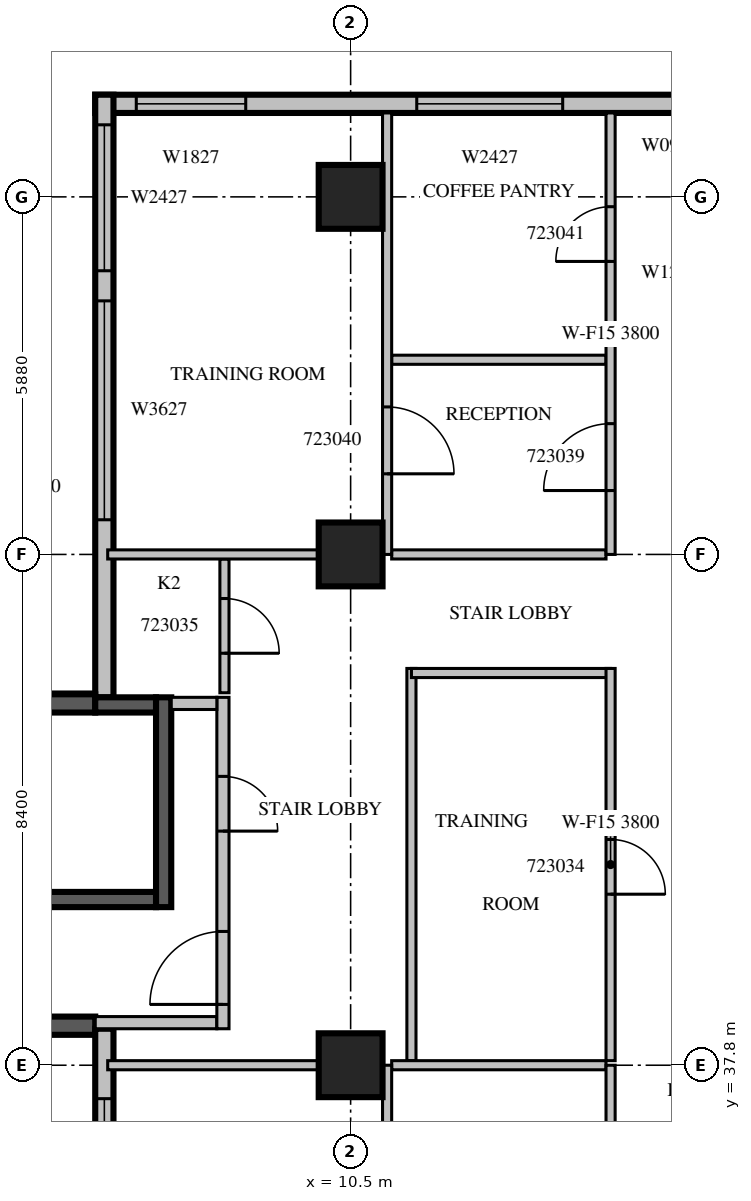
"""IFC4 building model, lengths in metres.
Left out: names, types, materials, properties, quantities, classifications, styles, units other than length and angle.
Written with IfcOpenShell. Run it as: python <this file> out.ifc"""

import sys

from ifc_helpers import new_model, si_unit, direction, frame, frame_2d, origin, origin_2d, place, context, subcontext, project, spatial, rectangle, extrude, source, transform, mapped, element, fill, save


model = new_model("IFC4")
c1 = context("Model", 3, precision=1e-05, world=origin(), true_north=direction((0.0, 1.0)))
c2 = subcontext(c1, "Body", "Model", "MODEL_VIEW")
j1 = project(units=[si_unit("LENGTHUNIT", "METRE"), si_unit("PLANEANGLEUNIT", "RADIAN")], contexts=[c1])
p1 = place(None, origin())
s1 = spatial("IfcSite", under=j1, at=p1, CompositionType="ELEMENT")
p2 = place(p1, origin())
s2 = spatial("IfcBuilding", under=s1, at=p2, CompositionType="ELEMENT")
p3 = place(p2, frame((0.0, 0.0, 107.7)))
s3 = spatial("IfcBuildingStorey", under=s2, at=p3, CompositionType="ELEMENT", Elevation=107.7)
m1 = source(origin(), c2, "Body", "SweptSolid", [
    extrude(rectangle(XDim=1.05, YDim=1.05, at=origin_2d()), origin(), (0.0, 0.0, 1.0), 4.2),
])
for number, where, z_axis, x_axis in (
    (1, (10.5, 37.8, 0.0), (0.0, 0.0, 1.0), (1.0, 0.0, 0.0)),
    (2, (10.5, 46.2, 0.0), (0.0, 0.0, 1.0), (1.0, 0.0, 0.0)),
    (3, (10.5, 52.08, 0.0), (0.0, 0.0, 1.0), (1.0, 0.0, 0.0)),
):
    element("IfcColumn", number, at=place(p3, frame(where, z_axis=z_axis, x_axis=x_axis)), inside=s3, PredefinedType="COLUMN", context=c2, shape_type="MappedRepresentation", body=[
        mapped(m1, transform((0.0, 0.0, 0.0), scale=1.0)),
    ])
m2 = source(origin(), c2, "Body", "SweptSolid", [
    extrude(rectangle(XDim=10.5, YDim=0.3, at=frame_2d((5.25, 0.0))), origin(), (0.0, 0.0, 1.0), 3.8),
])
p4 = place(p3, frame((16.8, 53.61, 0.0), z_axis=(0.0, 0.0, 1.0), x_axis=(-1.0, 0.0, 0.0)))
e4 = element("IfcWall", 4, at=p4, inside=s3, PredefinedType="STANDARD", context=c2, shape_type="MappedRepresentation", body=[
    mapped(m2, transform((0.0, 0.0, 0.0), scale=1.0)),
])
m3 = source(origin(), c2, "Body", "SweptSolid", [
    extrude(rectangle(XDim=1.8, YDim=2.7, at=frame_2d((0.9, 1.35))), frame((0.0, 0.16, 0.0), z_axis=(0.0, -1.0, 0.0), x_axis=(1.0, 0.0, 0.0)), (0.0, 0.0, 1.0), 0.32),
])
p5 = place(p4, frame((8.025, 0.0, 0.6)))
e5 = element("IfcOpeningElement", 5, at=p5, cuts=e4, PredefinedType="OPENING", context=c2, shape_type="MappedRepresentation", body=[
    mapped(m3, transform((0.0, 0.0, 0.0), scale=1.0)),
])
m4 = source(origin(), c2, "Body", "SweptSolid", [
    extrude(rectangle(XDim=2.4, YDim=2.7, at=frame_2d((1.2, 1.35))), frame((0.0, 0.16, 0.0), z_axis=(0.0, -1.0, 0.0), x_axis=(1.0, 0.0, 0.0)), (0.0, 0.0, 1.0), 0.32),
])
p6 = place(p4, frame((2.812, 0.0, 0.6)))
e6 = element("IfcOpeningElement", 6, at=p6, cuts=e4, PredefinedType="OPENING", context=c2, shape_type="MappedRepresentation", body=[
    mapped(m4, transform((0.0, 0.0, 0.0), scale=1.0)),
])
m5 = source(origin(), c2, "Body", "SweptSolid", [
    extrude(rectangle(XDim=9.91, YDim=0.3, at=frame_2d((4.955, 0.0))), origin(), (0.0, 0.0, 1.0), 3.8),
])
p7 = place(p3, frame((6.45, 53.76, 0.0), z_axis=(0.0, 0.0, 1.0), x_axis=(0.0, -1.0, 0.0)))
e7 = element("IfcWall", 7, at=p7, inside=s3, PredefinedType="STANDARD", context=c2, shape_type="MappedRepresentation", body=[
    mapped(m5, transform((0.0, 0.0, 0.0), scale=1.0)),
])
m6 = source(origin(), c2, "Body", "SweptSolid", [
    extrude(rectangle(XDim=3.6, YDim=2.7, at=frame_2d((1.8, 1.35))), frame((0.0, 0.16, 0.0), z_axis=(0.0, -1.0, 0.0), x_axis=(1.0, 0.0, 0.0)), (0.0, 0.0, 1.0), 0.32),
])
p8 = place(p7, frame((3.39, 0.0, 0.6)))
e8 = element("IfcOpeningElement", 8, at=p8, cuts=e7, PredefinedType="OPENING", context=c2, shape_type="MappedRepresentation", body=[
    mapped(m6, transform((0.0, 0.0, 0.0), scale=1.0)),
])
p9 = place(p7, frame((0.495, 0.0, 0.6)))
e9 = element("IfcOpeningElement", 9, at=p9, cuts=e7, PredefinedType="OPENING", context=c2, shape_type="MappedRepresentation", body=[
    mapped(m4, transform((0.0, 0.0, 0.0), scale=1.0)),
])
m7 = source(origin(), c2, "Body", "SweptSolid", [
    extrude(rectangle(XDim=6.1, YDim=0.3, at=frame_2d((3.05, 0.0))), origin(), (0.0, 0.0, 1.0), 3.8),
])
for number, where, z_axis, x_axis in (
    (10, (6.3, 43.75, 0.0), (0.0, 0.0, 1.0), (-1.0, 0.0, 0.0)),
    (11, (0.2, 38.45, 0.0), (0.0, 0.0, 1.0), (1.0, 0.0, 0.0)),
):
    element("IfcWall", number, at=place(p3, frame(where, z_axis=z_axis, x_axis=x_axis)), inside=s3, PredefinedType="SOLIDWALL", context=c2, shape_type="MappedRepresentation", body=[
        mapped(m7, transform((0.0, 0.0, 0.0), scale=1.0)),
    ])
p10 = place(p3, frame((6.45, 38.4, 0.0), z_axis=(0.0, 0.0, 1.0), x_axis=(0.0, -1.0, 0.0)))
e12 = element("IfcWall", 12, at=p10, inside=s3, PredefinedType="STANDARD", context=c2, shape_type="SweptSolid", body=[
    extrude(rectangle(XDim=16.4, YDim=0.3, at=frame_2d((8.2, 0.0))), origin(), (0.0, 0.0, 1.0), 3.8),
])
p11 = place(p10, frame((1.15, 0.0, 0.6)))
e13 = element("IfcOpeningElement", 13, at=p11, cuts=e12, PredefinedType="OPENING", context=c2, shape_type="MappedRepresentation", body=[
    mapped(m3, transform((0.0, 0.0, 0.0), scale=1.0)),
])
p12 = place(p10, frame((9.438, 0.0, 0.6)))
e14 = element("IfcOpeningElement", 14, at=p12, cuts=e12, PredefinedType="OPENING", context=c2, shape_type="MappedRepresentation", body=[
    mapped(m3, transform((0.0, 0.0, 0.0), scale=1.0)),
])
p13 = place(p10, frame((13.537, 0.0, 0.6)))
e15 = element("IfcOpeningElement", 15, at=p13, cuts=e12, PredefinedType="OPENING", context=c2, shape_type="MappedRepresentation", body=[
    mapped(m3, transform((0.0, 0.0, 0.0), scale=1.0)),
])
m8 = source(origin(), c2, "Body", "SweptSolid", [
    extrude(rectangle(XDim=1.0, YDim=2.1, at=frame_2d((0.5, 1.05))), frame((0.0, 0.16, 0.0), z_axis=(0.0, -1.0, 0.0), x_axis=(1.0, 0.0, 0.0)), (0.0, 0.0, 1.0), 0.32),
])
p14 = place(p10, frame((5.908, 0.0, 0.0)))
e16 = element("IfcOpeningElement", 16, at=p14, cuts=e12, PredefinedType="OPENING", context=c2, shape_type="MappedRepresentation", body=[
    mapped(m8, transform((0.0, 0.0, 0.0), scale=1.0)),
])
m9 = source(origin(), c2, "Body", "SweptSolid", [
    extrude(rectangle(XDim=7.0, YDim=0.25, at=frame_2d((3.5, 0.0))), origin(), (0.0, 0.0, 1.0), 3.8),
])
p15 = place(p3, frame((0.3, 40.525, 0.0), z_axis=(0.0, 0.0, 1.0), x_axis=(1.0, 0.0, 0.0)))
e17 = element("IfcWall", 17, at=p15, inside=s3, PredefinedType="SOLIDWALL", context=c2, shape_type="MappedRepresentation", body=[
    mapped(m9, transform((0.0, 0.0, 0.0), scale=1.0)),
])
m10 = source(origin(), c2, "Body", "SweptSolid", [
    extrude(rectangle(XDim=1.1, YDim=2.1, at=frame_2d((0.55, 1.05))), frame((0.0, 0.135, 0.0), z_axis=(0.0, -1.0, 0.0), x_axis=(1.0, 0.0, 0.0)), (0.0, 0.0, 1.0), 0.27),
])
p16 = place(p15, frame((0.55, 0.0, 0.0)))
e18 = element("IfcOpeningElement", 18, at=p16, cuts=e17, PredefinedType="OPENING", context=c2, shape_type="MappedRepresentation", body=[
    mapped(m10, transform((0.0, 0.0, 0.0), scale=1.0)),
])
m11 = source(origin(), c2, "Body", "SweptSolid", [
    extrude(rectangle(XDim=1.0, YDim=0.25, at=frame_2d((0.5, 0.0))), origin(), (0.0, 0.0, 1.0), 3.8),
])
p17 = place(p3, frame((6.3, 43.725, 0.0), z_axis=(0.0, 0.0, 1.0), x_axis=(1.0, 0.0, 0.0)))
e19 = element("IfcWall", 19, at=p17, inside=s3, PredefinedType="SOLIDWALL", context=c2, shape_type="MappedRepresentation", body=[
    mapped(m11, transform((0.0, 0.0, 0.0), scale=1.0)),
])
m12 = source(origin(), c2, "Body", "SweptSolid", [
    extrude(rectangle(XDim=3.45, YDim=0.25, at=frame_2d((1.725, 0.0))), origin(), (0.0, 0.0, 1.0), 3.8),
])
p18 = place(p3, frame((7.425, 40.4, 0.0), z_axis=(0.0, 0.0, 1.0), x_axis=(0.0, 1.0, 0.0)))
e20 = element("IfcWall", 20, at=p18, inside=s3, PredefinedType="SOLIDWALL", context=c2, shape_type="MappedRepresentation", body=[
    mapped(m12, transform((0.0, 0.0, 0.0), scale=1.0)),
])
m13 = source(origin(), c2, "Body", "SweptSolid", [
    extrude(rectangle(XDim=2.0, YDim=0.2, at=frame_2d((1.0, 0.0))), origin(), (0.0, 0.0, 1.0), 3.8),
])
p19 = place(p3, frame((6.3, 38.5, 0.0), z_axis=(0.0, 0.0, 1.0), x_axis=(1.0, 0.0, 0.0)))
e21 = element("IfcWall", 21, at=p19, inside=s3, PredefinedType="PARTITIONING", context=c2, shape_type="MappedRepresentation", body=[
    mapped(m13, transform((0.0, 0.0, 0.0), scale=1.0)),
])
m14 = source(origin(), c2, "Body", "SweptSolid", [
    extrude(rectangle(XDim=5.45, YDim=0.2, at=frame_2d((2.725, 0.0))), origin(), (0.0, 0.0, 1.0), 3.8),
])
p20 = place(p3, frame((8.4, 38.4, 0.0), z_axis=(0.0, 0.0, 1.0), x_axis=(0.0, 1.0, 0.0)))
e22 = element("IfcWall", 22, at=p20, inside=s3, PredefinedType="PARTITIONING", context=c2, shape_type="MappedRepresentation", body=[
    mapped(m14, transform((0.0, 0.0, 0.0), scale=1.0)),
])
m15 = source(origin(), c2, "Body", "SweptSolid", [
    extrude(rectangle(XDim=1.2, YDim=2.1, at=frame_2d((0.6, 1.05))), frame((0.0, 0.11, 0.0), z_axis=(0.0, -1.0, 0.0), x_axis=(1.0, 0.0, 0.0)), (0.0, 0.0, 1.0), 0.22),
])
p21 = place(p20, frame((0.4, 0.0, 0.0)))
e23 = element("IfcOpeningElement", 23, at=p21, cuts=e22, PredefinedType="OPENING", context=c2, shape_type="MappedRepresentation", body=[
    mapped(m15, transform((0.0, 0.0, 0.0), scale=1.0)),
])
m16 = source(origin(), c2, "Body", "SweptSolid", [
    extrude(rectangle(XDim=0.9, YDim=2.1, at=frame_2d((0.45, 1.05))), frame((0.0, 0.11, 0.0), z_axis=(0.0, -1.0, 0.0), x_axis=(1.0, 0.0, 0.0)), (0.0, 0.0, 1.0), 0.22),
])
p22 = place(p20, frame((3.25, 0.0, 0.0)))
e24 = element("IfcOpeningElement", 24, at=p22, cuts=e22, PredefinedType="OPENING", context=c2, shape_type="MappedRepresentation", body=[
    mapped(m16, transform((0.0, 0.0, 0.0), scale=1.0)),
])
m17 = source(origin(), c2, "Body", "SweptSolid", [
    extrude(rectangle(XDim=0.75, YDim=0.2, at=frame_2d((0.375, 0.0))), origin(), (0.0, 0.0, 1.0), 3.8),
])
p23 = place(p3, frame((7.55, 43.75, 0.0), z_axis=(0.0, 0.0, 1.0), x_axis=(1.0, 0.0, 0.0)))
e25 = element("IfcWall", 25, at=p23, inside=s3, PredefinedType="PARTITIONING", context=c2, shape_type="MappedRepresentation", body=[
    mapped(m17, transform((0.0, 0.0, 0.0), scale=1.0)),
])
m18 = source(origin(), c2, "Body", "SweptSolid", [
    extrude(rectangle(XDim=6.45, YDim=0.15, at=frame_2d((3.225, 0.0))), origin(), (0.0, 0.0, 1.0), 3.8),
])
p24 = place(p3, frame((11.5, 44.325, 0.0), z_axis=(0.0, 0.0, 1.0), x_axis=(0.0, -1.0, 0.0)))
e26 = element("IfcWall", 26, at=p24, inside=s3, PredefinedType="PARTITIONING", context=c2, shape_type="MappedRepresentation", body=[
    mapped(m18, transform((0.0, 0.0, 0.0), scale=1.0)),
])
m19 = source(origin(), c2, "Body", "SweptSolid", [
    extrude(rectangle(XDim=3.275, YDim=0.15, at=frame_2d((1.637, 0.0))), origin(), (0.0, 0.0, 1.0), 3.8),
])
p25 = place(p3, frame((14.775, 44.25, 0.0), z_axis=(0.0, 0.0, 1.0), x_axis=(-1.0, 0.0, 0.0)))
e27 = element("IfcWall", 27, at=p25, inside=s3, PredefinedType="PARTITIONING", context=c2, shape_type="MappedRepresentation", body=[
    mapped(m19, transform((0.0, 0.0, 0.0), scale=1.0)),
])
p26 = place(p3, frame((14.775, 37.875, 0.0), z_axis=(0.0, 0.0, 1.0), x_axis=(0.0, 1.0, 0.0)))
e28 = element("IfcWall", 28, at=p26, inside=s3, PredefinedType="PARTITIONING", context=c2, shape_type="MappedRepresentation", body=[
    mapped(m18, transform((0.0, 0.0, 0.0), scale=1.0)),
])
m20 = source(origin(), c2, "Body", "SweptSolid", [
    extrude(rectangle(XDim=0.9, YDim=2.1, at=frame_2d((0.45, 1.05))), frame((0.0, 0.085, 0.0), z_axis=(0.0, -1.0, 0.0), x_axis=(1.0, 0.0, 0.0)), (0.0, 0.0, 1.0), 0.17),
])
p27 = place(p26, frame((2.737, 0.0, 0.0)))
e29 = element("IfcOpeningElement", 29, at=p27, cuts=e28, PredefinedType="OPENING", context=c2, shape_type="MappedRepresentation", body=[
    mapped(m20, transform((0.0, 0.0, 0.0), scale=1.0)),
])
m21 = source(origin(), c2, "Body", "SweptSolid", [
    extrude(rectangle(XDim=2.2, YDim=0.15, at=frame_2d((1.1, 0.0))), origin(), (0.0, 0.0, 1.0), 3.8),
])
p28 = place(p3, frame((8.425, 43.925, 0.0), z_axis=(0.0, 0.0, 1.0), x_axis=(0.0, 1.0, 0.0)))
e30 = element("IfcWall", 30, at=p28, inside=s3, PredefinedType="PARTITIONING", context=c2, shape_type="MappedRepresentation", body=[
    mapped(m21, transform((0.0, 0.0, 0.0), scale=1.0)),
])
p29 = place(p28, frame((0.65, 0.0, 0.0)))
e31 = element("IfcOpeningElement", 31, at=p29, cuts=e30, PredefinedType="OPENING", context=c2, shape_type="MappedRepresentation", body=[
    mapped(m20, transform((0.0, 0.0, 0.0), scale=1.0)),
])
m22 = source(origin(), c2, "Body", "SweptSolid", [
    extrude(rectangle(XDim=3.471, YDim=0.15, at=frame_2d((1.736, 0.0))), origin(), (0.0, 0.0, 1.0), 3.8),
])
p30 = place(p3, frame((9.976, 37.8, 0.0), z_axis=(0.0, 0.0, 1.0), x_axis=(-1.0, 0.0, 0.0)))
e32 = element("IfcWall", 32, at=p30, inside=s3, PredefinedType="PARTITIONING", context=c2, shape_type="MappedRepresentation", body=[
    mapped(m22, transform((0.0, 0.0, 0.0), scale=1.0)),
])
m23 = source(origin(), c2, "Body", "SweptSolid", [
    extrude(rectangle(XDim=3.525, YDim=0.15, at=frame_2d((1.762, 0.0))), origin(), (0.0, 0.0, 1.0), 3.8),
])
p31 = place(p3, frame((14.7, 37.8, 0.0), z_axis=(0.0, 0.0, 1.0), x_axis=(-1.0, 0.0, 0.0)))
e33 = element("IfcWall", 33, at=p31, inside=s3, PredefinedType="PARTITIONING", context=c2, shape_type="MappedRepresentation", body=[
    mapped(m23, transform((0.0, 0.0, 0.0), scale=1.0)),
])
m24 = source(origin(), c2, "Body", "SweptSolid", [
    extrude(rectangle(XDim=8.4, YDim=0.15, at=frame_2d((4.2, 0.0))), origin(), (0.0, 0.0, 1.0), 3.8),
])
p32 = place(p3, frame((11.1, 29.4, 0.0), z_axis=(0.0, 0.0, 1.0), x_axis=(0.0, 1.0, 0.0)))
e34 = element("IfcWall", 34, at=p32, inside=s3, PredefinedType="PARTITIONING", context=c2, shape_type="MappedRepresentation", body=[
    mapped(m24, transform((0.0, 0.0, 0.0), scale=1.0)),
])
p33 = place(p32, frame((1.925, 0.0, 0.0)))
e35 = element("IfcOpeningElement", 35, at=p33, cuts=e34, PredefinedType="OPENING", context=c2, shape_type="MappedRepresentation", body=[
    mapped(m20, transform((0.0, 0.0, 0.0), scale=1.0)),
])
p34 = place(p32, frame((5.625, 0.0, 0.0)))
e36 = element("IfcOpeningElement", 36, at=p34, cuts=e34, PredefinedType="OPENING", context=c2, shape_type="MappedRepresentation", body=[
    mapped(m20, transform((0.0, 0.0, 0.0), scale=1.0)),
])
p35 = place(p3, frame((14.7, 49.401, 0.0), z_axis=(0.0, 0.0, 1.0), x_axis=(-1.0, 0.0, 0.0)))
e37 = element("IfcWall", 37, at=p35, inside=s3, PredefinedType="PARTITIONING", context=c2, shape_type="MappedRepresentation", body=[
    mapped(m23, transform((0.0, 0.0, 0.0), scale=1.0)),
])
p36 = place(p3, frame((9.976, 46.2, 0.0), z_axis=(0.0, 0.0, 1.0), x_axis=(-1.0, 0.0, 0.0)))
e38 = element("IfcWall", 38, at=p36, inside=s3, PredefinedType="PARTITIONING", context=c2, shape_type="MappedRepresentation", body=[
    mapped(m22, transform((0.0, 0.0, 0.0), scale=1.0)),
])
p37 = place(p3, frame((14.7, 46.2, 0.0), z_axis=(0.0, 0.0, 1.0), x_axis=(-1.0, 0.0, 0.0)))
e39 = element("IfcWall", 39, at=p37, inside=s3, PredefinedType="PARTITIONING", context=c2, shape_type="MappedRepresentation", body=[
    mapped(m23, transform((0.0, 0.0, 0.0), scale=1.0)),
])
m25 = source(origin(), c2, "Body", "SweptSolid", [
    extrude(rectangle(XDim=7.26, YDim=0.15, at=frame_2d((3.63, 0.0))), origin(), (0.0, 0.0, 1.0), 3.8),
])
p38 = place(p3, frame((11.1, 46.2, 0.0), z_axis=(0.0, 0.0, 1.0), x_axis=(0.0, 1.0, 0.0)))
e40 = element("IfcWall", 40, at=p38, inside=s3, PredefinedType="PARTITIONING", context=c2, shape_type="MappedRepresentation", body=[
    mapped(m25, transform((0.0, 0.0, 0.0), scale=1.0)),
])
m26 = source(origin(), c2, "Body", "SweptSolid", [
    extrude(rectangle(XDim=1.1, YDim=2.1, at=frame_2d((0.55, 1.05))), frame((0.0, 0.085, 0.0), z_axis=(0.0, -1.0, 0.0), x_axis=(1.0, 0.0, 0.0)), (0.0, 0.0, 1.0), 0.17),
])
p39 = place(p38, frame((1.326, 0.0, 0.0)))
e41 = element("IfcOpeningElement", 41, at=p39, cuts=e40, PredefinedType="OPENING", context=c2, shape_type="MappedRepresentation", body=[
    mapped(m26, transform((0.0, 0.0, 0.0), scale=1.0)),
])
p40 = place(p3, frame((14.775, 29.4, 0.0), z_axis=(0.0, 0.0, 1.0), x_axis=(0.0, 1.0, 0.0)))
e42 = element("IfcWall", 42, at=p40, inside=s3, PredefinedType="PARTITIONING", context=c2, shape_type="MappedRepresentation", body=[
    mapped(m24, transform((0.0, 0.0, 0.0), scale=1.0)),
])
m27 = source(origin(), c2, "Body", "SweptSolid", [
    extrude(rectangle(XDim=1.2, YDim=2.1, at=frame_2d((0.6, 1.05))), frame((0.0, 0.085, 0.0), z_axis=(0.0, -1.0, 0.0), x_axis=(1.0, 0.0, 0.0)), (0.0, 0.0, 1.0), 0.17),
])
p41 = place(p40, frame((3.6, 0.0, 0.0)))
e43 = element("IfcOpeningElement", 43, at=p41, cuts=e42, PredefinedType="OPENING", context=c2, shape_type="MappedRepresentation", body=[
    mapped(m27, transform((0.0, 0.0, 0.0), scale=1.0)),
])
p42 = place(p3, frame((14.775, 46.2, 0.0), z_axis=(0.0, 0.0, 1.0), x_axis=(0.0, 1.0, 0.0)))
e44 = element("IfcWall", 44, at=p42, inside=s3, PredefinedType="PARTITIONING", context=c2, shape_type="MappedRepresentation", body=[
    mapped(m25, transform((0.0, 0.0, 0.0), scale=1.0)),
])
p43 = place(p42, frame((1.051, 0.0, 0.0)))
e45 = element("IfcOpeningElement", 45, at=p43, cuts=e44, PredefinedType="OPENING", context=c2, shape_type="MappedRepresentation", body=[
    mapped(m26, transform((0.0, 0.0, 0.0), scale=1.0)),
])
p44 = place(p42, frame((4.818, 0.0, 0.0)))
e46 = element("IfcOpeningElement", 46, at=p44, cuts=e44, PredefinedType="OPENING", context=c2, shape_type="MappedRepresentation", body=[
    mapped(m20, transform((0.0, 0.0, 0.0), scale=1.0)),
])
m28 = source(origin(), c2, "Body", "SweptSolid", [
    extrude(rectangle(XDim=1.8, YDim=2.7, at=frame_2d((0.9, 1.35))), frame((0.0, 0.03, 0.0), z_axis=(0.0, -1.0, 0.0), x_axis=(1.0, 0.0, 0.0)), (0.0, 0.0, 1.0), 0.06),
])
p45 = place(p5, origin())
e47 = element("IfcWindow", 47, at=p45, inside=s3, PartitioningType="SINGLE_PANEL", PredefinedType="WINDOW", context=c2, shape_type="MappedRepresentation", body=[
    mapped(m28, transform((0.0, 0.0, 0.0), scale=1.0)),
])
fill(e5, e47)
m29 = source(origin(), c2, "Body", "SweptSolid", [
    extrude(rectangle(XDim=2.4, YDim=2.7, at=frame_2d((1.2, 1.35))), frame((0.0, 0.03, 0.0), z_axis=(0.0, -1.0, 0.0), x_axis=(1.0, 0.0, 0.0)), (0.0, 0.0, 1.0), 0.06),
])
p46 = place(p6, origin())
e48 = element("IfcWindow", 48, at=p46, inside=s3, PartitioningType="SINGLE_PANEL", PredefinedType="WINDOW", context=c2, shape_type="MappedRepresentation", body=[
    mapped(m29, transform((0.0, 0.0, 0.0), scale=1.0)),
])
fill(e6, e48)
m30 = source(origin(), c2, "Body", "SweptSolid", [
    extrude(rectangle(XDim=3.6, YDim=2.7, at=frame_2d((1.8, 1.35))), frame((0.0, 0.03, 0.0), z_axis=(0.0, -1.0, 0.0), x_axis=(1.0, 0.0, 0.0)), (0.0, 0.0, 1.0), 0.06),
])
p47 = place(p8, origin())
e49 = element("IfcWindow", 49, at=p47, inside=s3, PartitioningType="SINGLE_PANEL", PredefinedType="WINDOW", context=c2, shape_type="MappedRepresentation", body=[
    mapped(m30, transform((0.0, 0.0, 0.0), scale=1.0)),
])
fill(e8, e49)
p48 = place(p9, origin())
e50 = element("IfcWindow", 50, at=p48, inside=s3, PartitioningType="SINGLE_PANEL", PredefinedType="WINDOW", context=c2, shape_type="MappedRepresentation", body=[
    mapped(m29, transform((0.0, 0.0, 0.0), scale=1.0)),
])
fill(e9, e50)
p49 = place(p11, origin())
e51 = element("IfcWindow", 51, at=p49, inside=s3, PartitioningType="SINGLE_PANEL", PredefinedType="WINDOW", context=c2, shape_type="MappedRepresentation", body=[
    mapped(m28, transform((0.0, 0.0, 0.0), scale=1.0)),
])
fill(e13, e51)
m31 = source(origin(), c2, "Body", "SweptSolid", [
    extrude(rectangle(XDim=1.2, YDim=2.1, at=frame_2d((0.6, 1.05))), frame((0.0, 0.025, 0.0), z_axis=(0.0, -1.0, 0.0), x_axis=(1.0, 0.0, 0.0)), (0.0, 0.0, 1.0), 0.05),
])
p50 = place(p21, origin())
e52 = element("IfcDoor", 52, at=p50, inside=s3, OperationType="SINGLE_SWING_LEFT", PredefinedType="DOOR", context=c2, shape_type="MappedRepresentation", body=[
    mapped(m31, transform((0.0, 0.0, 0.0), scale=1.0)),
])
fill(e23, e52)
m32 = source(origin(), c2, "Body", "SweptSolid", [
    extrude(rectangle(XDim=0.9, YDim=2.1, at=frame_2d((0.45, 1.05))), frame((0.0, 0.025, 0.0), z_axis=(0.0, -1.0, 0.0), x_axis=(1.0, 0.0, 0.0)), (0.0, 0.0, 1.0), 0.05),
])
p51 = place(p22, origin())
e53 = element("IfcDoor", 53, at=p51, inside=s3, OperationType="SINGLE_SWING_RIGHT", PredefinedType="DOOR", context=c2, shape_type="MappedRepresentation", body=[
    mapped(m32, transform((0.0, 0.0, 0.0), scale=1.0)),
])
fill(e24, e53)
p52 = place(p27, origin())
e54 = element("IfcDoor", 54, at=p52, inside=s3, OperationType="SINGLE_SWING_RIGHT", PredefinedType="DOOR", context=c2, shape_type="MappedRepresentation", body=[
    mapped(m32, transform((0.0, 0.0, 0.0), scale=1.0)),
])
fill(e29, e54)
p53 = place(p29, origin())
e55 = element("IfcDoor", 55, at=p53, inside=s3, OperationType="SINGLE_SWING_RIGHT", PredefinedType="DOOR", context=c2, shape_type="MappedRepresentation", body=[
    mapped(m32, transform((0.0, 0.0, 0.0), scale=1.0)),
])
fill(e31, e55)
m33 = source(origin(), c2, "Body", "SweptSolid", [
    extrude(rectangle(XDim=1.1, YDim=2.1, at=frame_2d((0.55, 1.05))), frame((0.0, 0.025, 0.0), z_axis=(0.0, -1.0, 0.0), x_axis=(1.0, 0.0, 0.0)), (0.0, 0.0, 1.0), 0.05),
])
p54 = place(p43, origin())
e56 = element("IfcDoor", 56, at=p54, inside=s3, OperationType="SINGLE_SWING_LEFT", PredefinedType="DOOR", context=c2, shape_type="MappedRepresentation", body=[
    mapped(m33, transform((0.0, 0.0, 0.0), scale=1.0)),
])
fill(e45, e56)
p55 = place(p39, origin())
e57 = element("IfcDoor", 57, at=p55, inside=s3, OperationType="SINGLE_SWING_RIGHT", PredefinedType="DOOR", context=c2, shape_type="MappedRepresentation", body=[
    mapped(m33, transform((0.0, 0.0, 0.0), scale=1.0)),
])
fill(e41, e57)
p56 = place(p44, origin())
e58 = element("IfcDoor", 58, at=p56, inside=s3, OperationType="SINGLE_SWING_LEFT", PredefinedType="DOOR", context=c2, shape_type="MappedRepresentation", body=[
    mapped(m32, transform((0.0, 0.0, 0.0), scale=1.0)),
])
fill(e46, e58)
save(model, sys.argv[1])
